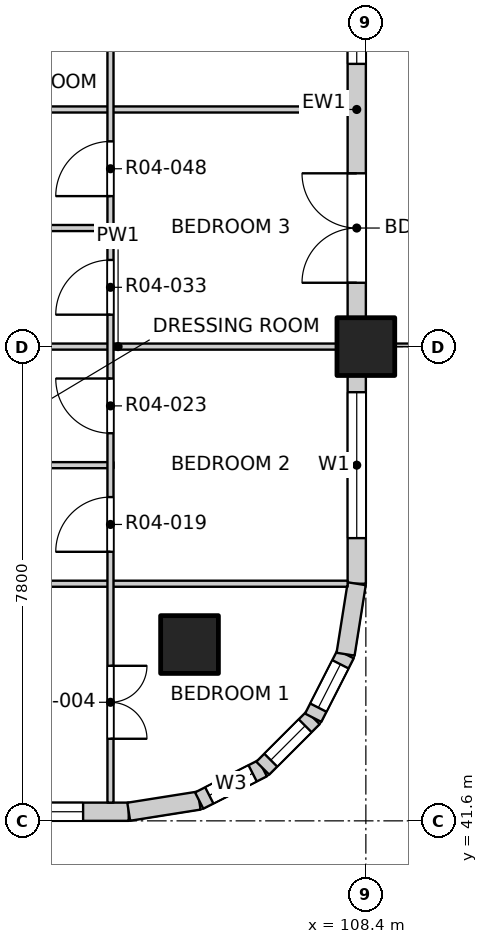
"""IFC4 building model, lengths in metres.
Left out: names, types, materials, properties, quantities, classifications, styles, units other than length and angle.
Written with IfcOpenShell. Run it as: python <this file> out.ifc"""

import sys

from ifc_helpers import new_model, si_unit, direction, frame, frame_2d, origin, origin_2d, place, context, subcontext, project, spatial, rectangle, extrude, element, fill, save


model = new_model("IFC4")
c1 = context("Model", 3, precision=1e-05, world=origin(), true_north=direction((0.0, 1.0)))
c2 = subcontext(c1, "Body", "Model", "MODEL_VIEW")
j1 = project(units=[si_unit("LENGTHUNIT", "METRE"), si_unit("PLANEANGLEUNIT", "RADIAN")], contexts=[c1])
p1 = place(None, origin())
s1 = spatial("IfcSite", under=j1, at=p1, CompositionType="ELEMENT")
p2 = place(p1, origin())
s2 = spatial("IfcBuilding", under=s1, at=p2, CompositionType="ELEMENT")
p3 = place(p2, frame((0.0, 0.0, 58.0)))
s3 = spatial("IfcBuildingStorey", under=s2, at=p3, CompositionType="ELEMENT", Elevation=58.0)
for number, where, z_axis, x_axis in (
    (1, (105.5, 44.5, -0.25), (0.0, 0.0, 1.0), (1.0, 0.0, 0.0)),
    (2, (108.4, 49.4, -0.25), (0.0, 0.0, 1.0), (1.0, 0.0, 0.0)),
):
    element("IfcColumn", number, at=place(p3, frame(where, z_axis=z_axis, x_axis=x_axis)), inside=s3, PredefinedType="COLUMN", context=c2, shape_type="SweptSolid", body=[
        extrude(rectangle(XDim=0.95, YDim=0.95, at=origin_2d()), origin(), (0.0, 0.0, 1.0), 3.4),
    ])
p4 = place(p3, frame((101.075, 41.75, 0.0), z_axis=(0.0, 0.0, 1.0), x_axis=(1.0, 0.0, 0.0)))
e3 = element("IfcWall", 3, at=p4, inside=s3, PredefinedType="SOLIDWALL", context=c2, shape_type="SweptSolid", body=[
    extrude(rectangle(XDim=3.425, YDim=0.3, at=frame_2d((1.712, 0.0))), origin(), (0.0, 0.0, 1.0), 2.7),
])
p5 = place(p4, frame((0.275, 0.0, 0.9)))
e4 = element("IfcOpeningElement", 4, at=p5, cuts=e3, PredefinedType="OPENING", context=c2, shape_type="SweptSolid", body=[
    extrude(rectangle(XDim=2.4, YDim=1.8, at=frame_2d((1.2, 0.9))), frame((0.0, 0.16, 0.0), z_axis=(0.0, -1.0, 0.0), x_axis=(1.0, 0.0, 0.0)), (0.0, 0.0, 1.0), 0.32),
])
p6 = place(p3, frame((108.25, 45.5, 0.0), z_axis=(0.0, 0.0, 1.0), x_axis=(0.0, 1.0, 0.0)))
e5 = element("IfcWall", 5, at=p6, inside=s3, PredefinedType="SOLIDWALL", context=c2, shape_type="SweptSolid", body=[
    extrude(rectangle(XDim=3.425, YDim=0.3, at=frame_2d((1.712, 0.0))), origin(), (0.0, 0.0, 1.0), 2.7),
])
p7 = place(p6, frame((0.75, 0.0, 0.9)))
e6 = element("IfcOpeningElement", 6, at=p7, cuts=e5, PredefinedType="OPENING", context=c2, shape_type="SweptSolid", body=[
    extrude(rectangle(XDim=2.4, YDim=1.8, at=frame_2d((1.2, 0.9))), frame((0.0, 0.16, 0.0), z_axis=(0.0, -1.0, 0.0), x_axis=(1.0, 0.0, 0.0)), (0.0, 0.0, 1.0), 0.32),
])
p8 = place(p3, frame((108.25, 49.875, 0.0), z_axis=(0.0, 0.0, 1.0), x_axis=(0.0, 1.0, 0.0)))
e7 = element("IfcWall", 7, at=p8, inside=s3, PredefinedType="SOLIDWALL", context=c2, shape_type="SweptSolid", body=[
    extrude(rectangle(XDim=6.85, YDim=0.3, at=frame_2d((3.425, 0.0))), origin(), (0.0, 0.0, 1.0), 2.7),
])
p9 = place(p8, frame((0.575, 0.0, 0.0)))
e8 = element("IfcOpeningElement", 8, at=p9, cuts=e7, PredefinedType="OPENING", context=c2, shape_type="SweptSolid", body=[
    extrude(rectangle(XDim=1.8, YDim=2.4, at=frame_2d((0.9, 1.2))), frame((0.0, 0.16, 0.0), z_axis=(0.0, -1.0, 0.0), x_axis=(1.0, 0.0, 0.0)), (0.0, 0.0, 1.0), 0.32),
])
p10 = place(p8, frame((4.175, 0.0, 0.9)))
e9 = element("IfcOpeningElement", 9, at=p10, cuts=e7, PredefinedType="OPENING", context=c2, shape_type="SweptSolid", body=[
    extrude(rectangle(XDim=2.4, YDim=1.8, at=frame_2d((1.2, 0.9))), frame((0.0, 0.16, 0.0), z_axis=(0.0, -1.0, 0.0), x_axis=(1.0, 0.0, 0.0)), (0.0, 0.0, 1.0), 0.32),
])
p11 = place(p3, frame((104.5, 41.75, 0.0), z_axis=(0.0, 0.0, 1.0), x_axis=(0.987678452879, 0.156496880861, 0.0)))
e10 = element("IfcWall", 10, at=p11, inside=s3, PredefinedType="SOLIDWALL", context=c2, shape_type="SweptSolid", body=[
    extrude(rectangle(XDim=1.173, YDim=0.3, at=frame_2d((0.586, 0.0))), origin(), (0.0, 0.0, 1.0), 2.7),
])
p12 = place(p3, frame((105.659, 41.934, 0.0), z_axis=(0.0, 0.0, 1.0), x_axis=(0.890988677504, 0.454025524128, 0.0)))
e11 = element("IfcWall", 11, at=p12, inside=s3, PredefinedType="SOLIDWALL", context=c2, shape_type="SweptSolid", body=[
    extrude(rectangle(XDim=1.173, YDim=0.3, at=frame_2d((0.587, 0.0))), origin(), (0.0, 0.0, 1.0), 2.7),
])
p13 = place(p12, frame((0.187, 0.0, 0.9)))
e12 = element("IfcOpeningElement", 12, at=p13, cuts=e11, PredefinedType="OPENING", context=c2, shape_type="SweptSolid", body=[
    extrude(rectangle(XDim=0.8, YDim=1.2, at=frame_2d((0.4, 0.6))), frame((0.0, 0.16, 0.0), z_axis=(0.0, -1.0, 0.0), x_axis=(1.0, 0.0, 0.0)), (0.0, 0.0, 1.0), 0.32),
])
p14 = place(p3, frame((106.704, 42.466, 0.0), z_axis=(0.0, 0.0, 1.0), x_axis=(0.707106781187, 0.707106781187, 0.0)))
e13 = element("IfcWall", 13, at=p14, inside=s3, PredefinedType="SOLIDWALL", context=c2, shape_type="SweptSolid", body=[
    extrude(rectangle(XDim=1.173, YDim=0.3, at=frame_2d((0.586, 0.0))), origin(), (0.0, 0.0, 1.0), 2.7),
])
p15 = place(p14, frame((0.187, 0.0, 0.9)))
e14 = element("IfcOpeningElement", 14, at=p15, cuts=e13, PredefinedType="OPENING", context=c2, shape_type="SweptSolid", body=[
    extrude(rectangle(XDim=0.8, YDim=1.2, at=frame_2d((0.4, 0.6))), frame((0.0, 0.16, 0.0), z_axis=(0.0, -1.0, 0.0), x_axis=(1.0, 0.0, 0.0)), (0.0, 0.0, 1.0), 0.32),
])
p16 = place(p3, frame((107.534, 43.296, 0.0), z_axis=(0.0, 0.0, 1.0), x_axis=(0.454025524128, 0.890988677504, 0.0)))
e15 = element("IfcWall", 15, at=p16, inside=s3, PredefinedType="SOLIDWALL", context=c2, shape_type="SweptSolid", body=[
    extrude(rectangle(XDim=1.173, YDim=0.3, at=frame_2d((0.587, 0.0))), origin(), (0.0, 0.0, 1.0), 2.7),
])
p17 = place(p16, frame((0.187, 0.0, 0.9)))
e16 = element("IfcOpeningElement", 16, at=p17, cuts=e15, PredefinedType="OPENING", context=c2, shape_type="SweptSolid", body=[
    extrude(rectangle(XDim=0.8, YDim=1.2, at=frame_2d((0.4, 0.6))), frame((0.0, 0.16, 0.0), z_axis=(0.0, -1.0, 0.0), x_axis=(1.0, 0.0, 0.0)), (0.0, 0.0, 1.0), 0.32),
])
p18 = place(p3, frame((108.066, 44.341, 0.0), z_axis=(0.0, 0.0, 1.0), x_axis=(0.156496880861, 0.987678452879, 0.0)))
e17 = element("IfcWall", 17, at=p18, inside=s3, PredefinedType="SOLIDWALL", context=c2, shape_type="SweptSolid", body=[
    extrude(rectangle(XDim=1.173, YDim=0.3, at=frame_2d((0.586, 0.0))), origin(), (0.0, 0.0, 1.0), 2.7),
])
p19 = place(p3, frame((96.6, 45.5, 0.0), z_axis=(0.0, 0.0, 1.0), x_axis=(1.0, 0.0, 0.0)))
e18 = element("IfcWall", 18, at=p19, inside=s3, PredefinedType="PARTITIONING", context=c2, shape_type="SweptSolid", body=[
    extrude(rectangle(XDim=11.5, YDim=0.1, at=frame_2d((5.75, 0.0))), origin(), (0.0, 0.0, 1.0), 3.15),
])
p20 = place(p19, frame((2.635, 0.0, 0.0)))
e19 = element("IfcOpeningElement", 19, at=p20, cuts=e18, PredefinedType="OPENING", context=c2, shape_type="SweptSolid", body=[
    extrude(rectangle(XDim=0.9, YDim=2.1, at=frame_2d((0.45, 1.05))), frame((0.0, 0.06, 0.0), z_axis=(0.0, -1.0, 0.0), x_axis=(1.0, 0.0, 0.0)), (0.0, 0.0, 1.0), 0.12),
])
p21 = place(p3, frame((100.55, 47.45, 0.0), z_axis=(0.0, 0.0, 1.0), x_axis=(1.0, 0.0, 0.0)))
e20 = element("IfcWall", 20, at=p21, inside=s3, PredefinedType="PARTITIONING", context=c2, shape_type="SweptSolid", body=[
    extrude(rectangle(XDim=3.7, YDim=0.1, at=frame_2d((1.85, 0.0))), origin(), (0.0, 0.0, 1.0), 3.15),
])
p22 = place(p3, frame((100.55, 49.4, 0.0), z_axis=(0.0, 0.0, 1.0), x_axis=(1.0, 0.0, 0.0)))
e21 = element("IfcWall", 21, at=p22, inside=s3, PredefinedType="PARTITIONING", context=c2, shape_type="SweptSolid", body=[
    extrude(rectangle(XDim=7.55, YDim=0.1, at=frame_2d((3.775, 0.0))), origin(), (0.0, 0.0, 1.0), 2.55),
])
p23 = place(p3, frame((100.55, 51.35, 0.0), z_axis=(0.0, 0.0, 1.0), x_axis=(1.0, 0.0, 0.0)))
e22 = element("IfcWall", 22, at=p23, inside=s3, PredefinedType="PARTITIONING", context=c2, shape_type="SweptSolid", body=[
    extrude(rectangle(XDim=3.7, YDim=0.1, at=frame_2d((1.85, 0.0))), origin(), (0.0, 0.0, 1.0), 3.15),
])
p24 = place(p3, frame((100.55, 53.3, 0.0), z_axis=(0.0, 0.0, 1.0), x_axis=(1.0, 0.0, 0.0)))
e23 = element("IfcWall", 23, at=p24, inside=s3, PredefinedType="PARTITIONING", context=c2, shape_type="SweptSolid", body=[
    extrude(rectangle(XDim=7.55, YDim=0.1, at=frame_2d((3.775, 0.0))), origin(), (0.0, 0.0, 1.0), 3.15),
])
p25 = place(p3, frame((104.2, 41.9, 0.0), z_axis=(0.0, 0.0, 1.0), x_axis=(0.0, 1.0, 0.0)))
e24 = element("IfcWall", 24, at=p25, inside=s3, PredefinedType="PARTITIONING", context=c2, shape_type="SweptSolid", body=[
    extrude(rectangle(XDim=46.2, YDim=0.1, at=frame_2d((23.1, 0.0))), origin(), (0.0, 0.0, 1.0), 3.15),
])
p26 = place(p25, frame((1.05, 0.0, 0.0)))
e25 = element("IfcOpeningElement", 25, at=p26, cuts=e24, PredefinedType="OPENING", context=c2, shape_type="SweptSolid", body=[
    extrude(rectangle(XDim=1.2, YDim=2.1, at=frame_2d((0.6, 1.05))), frame((0.0, 0.06, 0.0), z_axis=(0.0, -1.0, 0.0), x_axis=(1.0, 0.0, 0.0)), (0.0, 0.0, 1.0), 0.12),
])
p27 = place(p25, frame((4.125, 0.0, 0.0)))
e26 = element("IfcOpeningElement", 26, at=p27, cuts=e24, PredefinedType="OPENING", context=c2, shape_type="SweptSolid", body=[
    extrude(rectangle(XDim=0.9, YDim=2.1, at=frame_2d((0.45, 1.05))), frame((0.0, 0.06, 0.0), z_axis=(0.0, -1.0, 0.0), x_axis=(1.0, 0.0, 0.0)), (0.0, 0.0, 1.0), 0.12),
])
p28 = place(p25, frame((6.075, 0.0, 0.0)))
e27 = element("IfcOpeningElement", 27, at=p28, cuts=e24, PredefinedType="OPENING", context=c2, shape_type="SweptSolid", body=[
    extrude(rectangle(XDim=0.9, YDim=2.1, at=frame_2d((0.45, 1.05))), frame((0.0, 0.06, 0.0), z_axis=(0.0, -1.0, 0.0), x_axis=(1.0, 0.0, 0.0)), (0.0, 0.0, 1.0), 0.12),
])
p29 = place(p25, frame((8.025, 0.0, 0.0)))
e28 = element("IfcOpeningElement", 28, at=p29, cuts=e24, PredefinedType="OPENING", context=c2, shape_type="SweptSolid", body=[
    extrude(rectangle(XDim=0.9, YDim=2.1, at=frame_2d((0.45, 1.05))), frame((0.0, 0.06, 0.0), z_axis=(0.0, -1.0, 0.0), x_axis=(1.0, 0.0, 0.0)), (0.0, 0.0, 1.0), 0.12),
])
p30 = place(p25, frame((9.975, 0.0, 0.0)))
e29 = element("IfcOpeningElement", 29, at=p30, cuts=e24, PredefinedType="OPENING", context=c2, shape_type="SweptSolid", body=[
    extrude(rectangle(XDim=0.9, YDim=2.1, at=frame_2d((0.45, 1.05))), frame((0.0, 0.06, 0.0), z_axis=(0.0, -1.0, 0.0), x_axis=(1.0, 0.0, 0.0)), (0.0, 0.0, 1.0), 0.12),
])
p31 = place(p25, frame((12.75, 0.0, 0.0)))
e30 = element("IfcOpeningElement", 30, at=p31, cuts=e24, PredefinedType="OPENING", context=c2, shape_type="SweptSolid", body=[
    extrude(rectangle(XDim=1.2, YDim=2.1, at=frame_2d((0.6, 1.05))), frame((0.0, 0.06, 0.0), z_axis=(0.0, -1.0, 0.0), x_axis=(1.0, 0.0, 0.0)), (0.0, 0.0, 1.0), 0.12),
])
p32 = place(p25, frame((15.825, 0.0, 0.0)))
e31 = element("IfcOpeningElement", 31, at=p32, cuts=e24, PredefinedType="OPENING", context=c2, shape_type="SweptSolid", body=[
    extrude(rectangle(XDim=0.9, YDim=2.1, at=frame_2d((0.45, 1.05))), frame((0.0, 0.06, 0.0), z_axis=(0.0, -1.0, 0.0), x_axis=(1.0, 0.0, 0.0)), (0.0, 0.0, 1.0), 0.12),
])
p33 = place(p25, frame((17.775, 0.0, 0.0)))
e32 = element("IfcOpeningElement", 32, at=p33, cuts=e24, PredefinedType="OPENING", context=c2, shape_type="SweptSolid", body=[
    extrude(rectangle(XDim=0.9, YDim=2.1, at=frame_2d((0.45, 1.05))), frame((0.0, 0.06, 0.0), z_axis=(0.0, -1.0, 0.0), x_axis=(1.0, 0.0, 0.0)), (0.0, 0.0, 1.0), 0.12),
])
p34 = place(p25, frame((20.55, 0.0, 0.0)))
e33 = element("IfcOpeningElement", 33, at=p34, cuts=e24, PredefinedType="OPENING", context=c2, shape_type="SweptSolid", body=[
    extrude(rectangle(XDim=1.2, YDim=2.1, at=frame_2d((0.6, 1.05))), frame((0.0, 0.06, 0.0), z_axis=(0.0, -1.0, 0.0), x_axis=(1.0, 0.0, 0.0)), (0.0, 0.0, 1.0), 0.12),
])
p35 = place(p25, frame((24.45, 0.0, 0.0)))
e34 = element("IfcOpeningElement", 34, at=p35, cuts=e24, PredefinedType="OPENING", context=c2, shape_type="SweptSolid", body=[
    extrude(rectangle(XDim=1.2, YDim=2.1, at=frame_2d((0.6, 1.05))), frame((0.0, 0.06, 0.0), z_axis=(0.0, -1.0, 0.0), x_axis=(1.0, 0.0, 0.0)), (0.0, 0.0, 1.0), 0.12),
])
p36 = place(p25, frame((27.525, 0.0, 0.0)))
e35 = element("IfcOpeningElement", 35, at=p36, cuts=e24, PredefinedType="OPENING", context=c2, shape_type="SweptSolid", body=[
    extrude(rectangle(XDim=0.9, YDim=2.1, at=frame_2d((0.45, 1.05))), frame((0.0, 0.06, 0.0), z_axis=(0.0, -1.0, 0.0), x_axis=(1.0, 0.0, 0.0)), (0.0, 0.0, 1.0), 0.12),
])
p37 = place(p25, frame((29.475, 0.0, 0.0)))
e36 = element("IfcOpeningElement", 36, at=p37, cuts=e24, PredefinedType="OPENING", context=c2, shape_type="SweptSolid", body=[
    extrude(rectangle(XDim=0.9, YDim=2.1, at=frame_2d((0.45, 1.05))), frame((0.0, 0.06, 0.0), z_axis=(0.0, -1.0, 0.0), x_axis=(1.0, 0.0, 0.0)), (0.0, 0.0, 1.0), 0.12),
])
p38 = place(p25, frame((31.425, 0.0, 0.0)))
e37 = element("IfcOpeningElement", 37, at=p38, cuts=e24, PredefinedType="OPENING", context=c2, shape_type="SweptSolid", body=[
    extrude(rectangle(XDim=0.9, YDim=2.1, at=frame_2d((0.45, 1.05))), frame((0.0, 0.06, 0.0), z_axis=(0.0, -1.0, 0.0), x_axis=(1.0, 0.0, 0.0)), (0.0, 0.0, 1.0), 0.12),
])
p39 = place(p25, frame((33.375, 0.0, 0.0)))
e38 = element("IfcOpeningElement", 38, at=p39, cuts=e24, PredefinedType="OPENING", context=c2, shape_type="SweptSolid", body=[
    extrude(rectangle(XDim=0.9, YDim=2.1, at=frame_2d((0.45, 1.05))), frame((0.0, 0.06, 0.0), z_axis=(0.0, -1.0, 0.0), x_axis=(1.0, 0.0, 0.0)), (0.0, 0.0, 1.0), 0.12),
])
p40 = place(p25, frame((36.15, 0.0, 0.0)))
e39 = element("IfcOpeningElement", 39, at=p40, cuts=e24, PredefinedType="OPENING", context=c2, shape_type="SweptSolid", body=[
    extrude(rectangle(XDim=1.2, YDim=2.1, at=frame_2d((0.6, 1.05))), frame((0.0, 0.06, 0.0), z_axis=(0.0, -1.0, 0.0), x_axis=(1.0, 0.0, 0.0)), (0.0, 0.0, 1.0), 0.12),
])
p41 = place(p25, frame((39.225, 0.0, 0.0)))
e40 = element("IfcOpeningElement", 40, at=p41, cuts=e24, PredefinedType="OPENING", context=c2, shape_type="SweptSolid", body=[
    extrude(rectangle(XDim=0.9, YDim=2.1, at=frame_2d((0.45, 1.05))), frame((0.0, 0.06, 0.0), z_axis=(0.0, -1.0, 0.0), x_axis=(1.0, 0.0, 0.0)), (0.0, 0.0, 1.0), 0.12),
])
p42 = place(p25, frame((41.175, 0.0, 0.0)))
e41 = element("IfcOpeningElement", 41, at=p42, cuts=e24, PredefinedType="OPENING", context=c2, shape_type="SweptSolid", body=[
    extrude(rectangle(XDim=0.9, YDim=2.1, at=frame_2d((0.45, 1.05))), frame((0.0, 0.06, 0.0), z_axis=(0.0, -1.0, 0.0), x_axis=(1.0, 0.0, 0.0)), (0.0, 0.0, 1.0), 0.12),
])
p43 = place(p25, frame((43.95, 0.0, 0.0)))
e42 = element("IfcOpeningElement", 42, at=p43, cuts=e24, PredefinedType="OPENING", context=c2, shape_type="SweptSolid", body=[
    extrude(rectangle(XDim=1.2, YDim=2.1, at=frame_2d((0.6, 1.05))), frame((0.0, 0.06, 0.0), z_axis=(0.0, -1.0, 0.0), x_axis=(1.0, 0.0, 0.0)), (0.0, 0.0, 1.0), 0.12),
])
p44 = place(p5, origin())
e43 = element("IfcWindow", 43, at=p44, inside=s3, PartitioningType="DOUBLE_PANEL_VERTICAL", PredefinedType="WINDOW", context=c2, shape_type="SweptSolid", body=[
    extrude(rectangle(XDim=2.4, YDim=1.8, at=frame_2d((1.2, 0.9))), frame((0.0, 0.03, 0.0), z_axis=(0.0, -1.0, 0.0), x_axis=(1.0, 0.0, 0.0)), (0.0, 0.0, 1.0), 0.06),
])
fill(e4, e43)
p45 = place(p7, origin())
e44 = element("IfcWindow", 44, at=p45, inside=s3, PartitioningType="DOUBLE_PANEL_VERTICAL", PredefinedType="WINDOW", context=c2, shape_type="SweptSolid", body=[
    extrude(rectangle(XDim=2.4, YDim=1.8, at=frame_2d((1.2, 0.9))), frame((0.0, 0.03, 0.0), z_axis=(0.0, -1.0, 0.0), x_axis=(1.0, 0.0, 0.0)), (0.0, 0.0, 1.0), 0.06),
])
fill(e6, e44)
p46 = place(p9, origin())
e45 = element("IfcDoor", 45, at=p46, inside=s3, OperationType="DOUBLE_DOOR_SINGLE_SWING", PredefinedType="DOOR", context=c2, shape_type="SweptSolid", body=[
    extrude(rectangle(XDim=1.8, YDim=2.4, at=frame_2d((0.9, 1.2))), frame((0.0, 0.025, 0.0), z_axis=(0.0, -1.0, 0.0), x_axis=(1.0, 0.0, 0.0)), (0.0, 0.0, 1.0), 0.05),
])
fill(e8, e45)
p47 = place(p10, origin())
e46 = element("IfcWindow", 46, at=p47, inside=s3, PartitioningType="DOUBLE_PANEL_VERTICAL", PredefinedType="WINDOW", context=c2, shape_type="SweptSolid", body=[
    extrude(rectangle(XDim=2.4, YDim=1.8, at=frame_2d((1.2, 0.9))), frame((0.0, 0.03, 0.0), z_axis=(0.0, -1.0, 0.0), x_axis=(1.0, 0.0, 0.0)), (0.0, 0.0, 1.0), 0.06),
])
fill(e9, e46)
p48 = place(p13, origin())
e47 = element("IfcWindow", 47, at=p48, inside=s3, PartitioningType="SINGLE_PANEL", PredefinedType="WINDOW", context=c2, shape_type="SweptSolid", body=[
    extrude(rectangle(XDim=0.8, YDim=1.2, at=frame_2d((0.4, 0.6))), frame((0.0, 0.03, 0.0), z_axis=(0.0, -1.0, 0.0), x_axis=(1.0, 0.0, 0.0)), (0.0, 0.0, 1.0), 0.06),
])
fill(e12, e47)
p49 = place(p15, origin())
e48 = element("IfcWindow", 48, at=p49, inside=s3, PartitioningType="SINGLE_PANEL", PredefinedType="WINDOW", context=c2, shape_type="SweptSolid", body=[
    extrude(rectangle(XDim=0.8, YDim=1.2, at=frame_2d((0.4, 0.6))), frame((0.0, 0.03, 0.0), z_axis=(0.0, -1.0, 0.0), x_axis=(1.0, 0.0, 0.0)), (0.0, 0.0, 1.0), 0.06),
])
fill(e14, e48)
p50 = place(p17, origin())
e49 = element("IfcWindow", 49, at=p50, inside=s3, PartitioningType="SINGLE_PANEL", PredefinedType="WINDOW", context=c2, shape_type="SweptSolid", body=[
    extrude(rectangle(XDim=0.8, YDim=1.2, at=frame_2d((0.4, 0.6))), frame((0.0, 0.03, 0.0), z_axis=(0.0, -1.0, 0.0), x_axis=(1.0, 0.0, 0.0)), (0.0, 0.0, 1.0), 0.06),
])
fill(e16, e49)
p51 = place(p26, origin())
e50 = element("IfcDoor", 50, at=p51, inside=s3, OperationType="DOUBLE_DOOR_SINGLE_SWING", PredefinedType="DOOR", context=c2, shape_type="SweptSolid", body=[
    extrude(rectangle(XDim=1.2, YDim=2.1, at=frame_2d((0.6, 1.05))), frame((0.0, 0.025, 0.0), z_axis=(0.0, -1.0, 0.0), x_axis=(1.0, 0.0, 0.0)), (0.0, 0.0, 1.0), 0.05),
])
fill(e25, e50)
p52 = place(p27, origin())
e51 = element("IfcDoor", 51, at=p52, inside=s3, OperationType="SINGLE_SWING_LEFT", PredefinedType="DOOR", context=c2, shape_type="SweptSolid", body=[
    extrude(rectangle(XDim=0.9, YDim=2.1, at=frame_2d((0.45, 1.05))), frame((0.0, 0.025, 0.0), z_axis=(0.0, -1.0, 0.0), x_axis=(1.0, 0.0, 0.0)), (0.0, 0.0, 1.0), 0.05),
])
fill(e26, e51)
p53 = place(p28, origin())
e52 = element("IfcDoor", 52, at=p53, inside=s3, OperationType="SINGLE_SWING_RIGHT", PredefinedType="DOOR", context=c2, shape_type="SweptSolid", body=[
    extrude(rectangle(XDim=0.9, YDim=2.1, at=frame_2d((0.45, 1.05))), frame((0.0, 0.025, 0.0), z_axis=(0.0, -1.0, 0.0), x_axis=(1.0, 0.0, 0.0)), (0.0, 0.0, 1.0), 0.05),
])
fill(e27, e52)
p54 = place(p29, origin())
e53 = element("IfcDoor", 53, at=p54, inside=s3, OperationType="SINGLE_SWING_LEFT", PredefinedType="DOOR", context=c2, shape_type="SweptSolid", body=[
    extrude(rectangle(XDim=0.9, YDim=2.1, at=frame_2d((0.45, 1.05))), frame((0.0, 0.025, 0.0), z_axis=(0.0, -1.0, 0.0), x_axis=(1.0, 0.0, 0.0)), (0.0, 0.0, 1.0), 0.05),
])
fill(e28, e53)
p55 = place(p30, origin())
e54 = element("IfcDoor", 54, at=p55, inside=s3, OperationType="SINGLE_SWING_LEFT", PredefinedType="DOOR", context=c2, shape_type="SweptSolid", body=[
    extrude(rectangle(XDim=0.9, YDim=2.1, at=frame_2d((0.45, 1.05))), frame((0.0, 0.025, 0.0), z_axis=(0.0, -1.0, 0.0), x_axis=(1.0, 0.0, 0.0)), (0.0, 0.0, 1.0), 0.05),
])
fill(e29, e54)
save(model, sys.argv[1])
